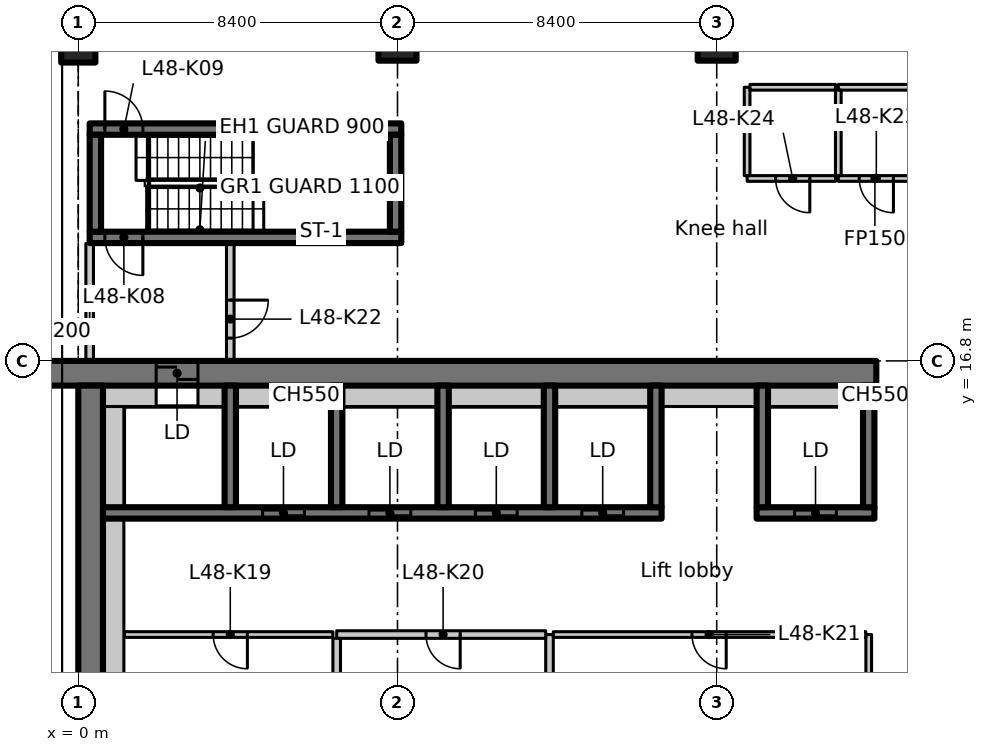
"""IFC4 building model, lengths in metres.
Left out: names, types, materials, properties, quantities, classifications, styles, units other than length and angle.
Written with IfcOpenShell. Run it as: python <this file> out.ifc"""

import sys

from ifc_helpers import new_model, si_unit, direction, frame, frame_2d, origin, origin_2d, place, context, subcontext, project, spatial, rectangle, extrude, element, fill, save


model = new_model("IFC4")
c1 = context("Model", 3, precision=1e-05, world=origin(), true_north=direction((0.0, 1.0)))
c2 = subcontext(c1, "Body", "Model", "MODEL_VIEW")
j1 = project(units=[si_unit("LENGTHUNIT", "METRE"), si_unit("PLANEANGLEUNIT", "RADIAN")], contexts=[c1])
p1 = place(None, origin())
s1 = spatial("IfcSite", under=j1, at=p1, CompositionType="ELEMENT")
p2 = place(p1, origin())
s2 = spatial("IfcBuilding", under=s1, at=p2, CompositionType="ELEMENT")
p3 = place(p2, frame((0.0, 0.0, 192.0)))
s3 = spatial("IfcBuildingStorey", under=s2, at=p3, CompositionType="ELEMENT", Elevation=192.0)
p4 = place(p3, frame((0.0, 25.2, 0.0), z_axis=(0.0, 0.0, 1.0), x_axis=(1.0, 0.0, 0.0)))
e1 = element("IfcColumn", 1, at=p4, inside=s3, PredefinedType="COLUMN", context=c2, shape_type="SweptSolid", body=[
    extrude(rectangle(XDim=0.9, YDim=1.1, at=origin_2d()), origin(), (0.0, 0.0, 1.0), 3.35),
])
for number, where, z_axis, x_axis in (
    (2, (8.4, 25.2, 0.0), (0.0, 0.0, 1.0), (1.0, 0.0, 0.0)),
    (3, (16.8, 25.2, 0.0), (0.0, 0.0, 1.0), (1.0, 0.0, 0.0)),
):
    element("IfcColumn", number, at=place(p3, frame(where, z_axis=z_axis, x_axis=x_axis)), inside=s3, PredefinedType="COLUMN", context=c2, shape_type="SweptSolid", body=[
        extrude(rectangle(XDim=1.0, YDim=1.0, at=origin_2d()), origin(), (0.0, 0.0, 1.0), 3.35),
    ])
p5 = place(p3, frame((-1.1, 16.475, 0.0), z_axis=(0.0, 0.0, 1.0), x_axis=(1.0, 0.0, 0.0)))
e4 = element("IfcWall", 4, at=p5, inside=s3, PredefinedType="SHEAR", context=c2, shape_type="SweptSolid", body=[
    extrude(rectangle(XDim=22.1, YDim=0.65, at=frame_2d((11.05, 0.0))), origin(), (0.0, 0.0, 1.0), 3.35),
])
p6 = place(p5, frame((3.15, 0.0, 0.0)))
e5 = element("IfcOpeningElement", 5, at=p6, cuts=e4, PredefinedType="OPENING", context=c2, shape_type="SweptSolid", body=[
    extrude(rectangle(XDim=1.1, YDim=2.3, at=frame_2d((0.55, 1.15))), frame((0.0, 0.335, 0.0), z_axis=(0.0, -1.0, 0.0), x_axis=(1.0, 0.0, 0.0)), (0.0, 0.0, 1.0), 0.67),
])
p7 = place(p3, frame((0.325, 7.286, 0.0), z_axis=(0.0, 0.0, 1.0), x_axis=(0.0, 1.0, 0.0)))
e6 = element("IfcWall", 6, at=p7, inside=s3, PredefinedType="SHEAR", context=c2, shape_type="SweptSolid", body=[
    extrude(rectangle(XDim=8.864, YDim=0.65, at=frame_2d((4.432, 0.0))), origin(), (0.0, 0.0, 1.0), 3.35),
])
p8 = place(p3, frame((0.65, 15.875, 0.0), z_axis=(0.0, 0.0, 1.0), x_axis=(1.0, 0.0, 0.0)))
e7 = element("IfcWall", 7, at=p8, inside=s3, PredefinedType="PARTITIONING", context=c2, shape_type="SweptSolid", body=[
    extrude(rectangle(XDim=1.4, YDim=0.55, at=frame_2d((0.7, 0.0))), origin(), (0.0, 0.0, 1.0), 3.35),
])
p9 = place(p3, frame((0.65, 12.8, 0.0), z_axis=(0.0, 0.0, 1.0), x_axis=(1.0, 0.0, 0.0)))
e8 = element("IfcWall", 8, at=p9, inside=s3, PredefinedType="SHEAR", context=c2, shape_type="SweptSolid", body=[
    extrude(rectangle(XDim=14.7, YDim=0.3, at=frame_2d((7.35, 0.0))), origin(), (0.0, 0.0, 1.0), 3.35),
])
p10 = place(p9, frame((4.2, 0.0, 0.0)))
e9 = element("IfcOpeningElement", 9, at=p10, cuts=e8, PredefinedType="OPENING", context=c2, shape_type="SweptSolid", body=[
    extrude(rectangle(XDim=1.1, YDim=2.3, at=frame_2d((0.55, 1.15))), frame((0.0, 0.16, 0.0), z_axis=(0.0, -1.0, 0.0), x_axis=(1.0, 0.0, 0.0)), (0.0, 0.0, 1.0), 0.32),
])
p11 = place(p9, frame((7.0, 0.0, 0.0)))
e10 = element("IfcOpeningElement", 10, at=p11, cuts=e8, PredefinedType="OPENING", context=c2, shape_type="SweptSolid", body=[
    extrude(rectangle(XDim=1.1, YDim=2.3, at=frame_2d((0.55, 1.15))), frame((0.0, 0.16, 0.0), z_axis=(0.0, -1.0, 0.0), x_axis=(1.0, 0.0, 0.0)), (0.0, 0.0, 1.0), 0.32),
])
p12 = place(p9, frame((9.8, 0.0, 0.0)))
e11 = element("IfcOpeningElement", 11, at=p12, cuts=e8, PredefinedType="OPENING", context=c2, shape_type="SweptSolid", body=[
    extrude(rectangle(XDim=1.1, YDim=2.3, at=frame_2d((0.55, 1.15))), frame((0.0, 0.16, 0.0), z_axis=(0.0, -1.0, 0.0), x_axis=(1.0, 0.0, 0.0)), (0.0, 0.0, 1.0), 0.32),
])
p13 = place(p9, frame((12.6, 0.0, 0.0)))
e12 = element("IfcOpeningElement", 12, at=p13, cuts=e8, PredefinedType="OPENING", context=c2, shape_type="SweptSolid", body=[
    extrude(rectangle(XDim=1.1, YDim=2.3, at=frame_2d((0.55, 1.15))), frame((0.0, 0.16, 0.0), z_axis=(0.0, -1.0, 0.0), x_axis=(1.0, 0.0, 0.0)), (0.0, 0.0, 1.0), 0.32),
])
for number, where, z_axis, x_axis in (
    (13, (4.0, 12.95, 0.0), (0.0, 0.0, 1.0), (0.0, 1.0, 0.0)),
    (14, (6.8, 12.95, 0.0), (0.0, 0.0, 1.0), (0.0, 1.0, 0.0)),
    (15, (9.6, 12.95, 0.0), (0.0, 0.0, 1.0), (0.0, 1.0, 0.0)),
    (16, (12.4, 12.95, 0.0), (0.0, 0.0, 1.0), (0.0, 1.0, 0.0)),
    (17, (15.2, 12.95, 0.0), (0.0, 0.0, 1.0), (0.0, 1.0, 0.0)),
):
    element("IfcWall", number, at=place(p3, frame(where, z_axis=z_axis, x_axis=x_axis)), inside=s3, PredefinedType="SHEAR", context=c2, shape_type="SweptSolid", body=[
        extrude(rectangle(XDim=3.2, YDim=0.3, at=frame_2d((1.6, 0.0))), origin(), (0.0, 0.0, 1.0), 3.35),
    ])
p14 = place(p3, frame((17.85, 12.8, 0.0), z_axis=(0.0, 0.0, 1.0), x_axis=(1.0, 0.0, 0.0)))
e18 = element("IfcWall", 18, at=p14, inside=s3, PredefinedType="SHEAR", context=c2, shape_type="SweptSolid", body=[
    extrude(rectangle(XDim=3.1, YDim=0.3, at=frame_2d((1.55, 0.0))), origin(), (0.0, 0.0, 1.0), 3.35),
])
p15 = place(p14, frame((1.0, 0.0, 0.0)))
e19 = element("IfcOpeningElement", 19, at=p15, cuts=e18, PredefinedType="OPENING", context=c2, shape_type="SweptSolid", body=[
    extrude(rectangle(XDim=1.1, YDim=2.3, at=frame_2d((0.55, 1.15))), frame((0.0, 0.16, 0.0), z_axis=(0.0, -1.0, 0.0), x_axis=(1.0, 0.0, 0.0)), (0.0, 0.0, 1.0), 0.32),
])
for number, where, z_axis, x_axis in (
    (20, (18.0, 12.95, 0.0), (0.0, 0.0, 1.0), (0.0, 1.0, 0.0)),
    (21, (20.8, 12.95, 0.0), (0.0, 0.0, 1.0), (0.0, 1.0, 0.0)),
):
    element("IfcWall", number, at=place(p3, frame(where, z_axis=z_axis, x_axis=x_axis)), inside=s3, PredefinedType="SHEAR", context=c2, shape_type="SweptSolid", body=[
        extrude(rectangle(XDim=3.2, YDim=0.3, at=frame_2d((1.6, 0.0))), origin(), (0.0, 0.0, 1.0), 3.35),
    ])
p16 = place(p3, frame((8.5, 20.05, 0.0), z_axis=(0.0, 0.0, 1.0), x_axis=(-1.0, 0.0, 0.0)))
e22 = element("IfcWall", 22, at=p16, inside=s3, PredefinedType="SHEAR", context=c2, shape_type="SweptSolid", body=[
    extrude(rectangle(XDim=8.2, YDim=0.3, at=frame_2d((4.1, 0.0))), origin(), (0.0, 0.0, 1.0), 3.35),
])
p17 = place(p16, frame((6.8, 0.0, 0.0)))
e23 = element("IfcOpeningElement", 23, at=p17, cuts=e22, PredefinedType="OPENING", context=c2, shape_type="SweptSolid", body=[
    extrude(rectangle(XDim=1.0, YDim=2.1, at=frame_2d((0.5, 1.05))), frame((0.0, 0.16, 0.0), z_axis=(0.0, -1.0, 0.0), x_axis=(1.0, 0.0, 0.0)), (0.0, 0.0, 1.0), 0.32),
])
p18 = place(p3, frame((0.3, 22.9, 0.0), z_axis=(0.0, 0.0, 1.0), x_axis=(1.0, 0.0, 0.0)))
e24 = element("IfcWall", 24, at=p18, inside=s3, PredefinedType="SHEAR", context=c2, shape_type="SweptSolid", body=[
    extrude(rectangle(XDim=8.2, YDim=0.3, at=frame_2d((4.1, 0.0))), origin(), (0.0, 0.0, 1.0), 3.35),
])
p19 = place(p18, frame((0.4, 0.0, 0.0)))
e25 = element("IfcOpeningElement", 25, at=p19, cuts=e24, PredefinedType="OPENING", context=c2, shape_type="SweptSolid", body=[
    extrude(rectangle(XDim=1.0, YDim=2.1, at=frame_2d((0.5, 1.05))), frame((0.0, 0.16, 0.0), z_axis=(0.0, -1.0, 0.0), x_axis=(1.0, 0.0, 0.0)), (0.0, 0.0, 1.0), 0.32),
])
for number, where, z_axis, x_axis in (
    (26, (0.45, 20.2, 0.0), (0.0, 0.0, 1.0), (0.0, 1.0, 0.0)),
    (27, (8.35, 20.2, 0.0), (0.0, 0.0, 1.0), (0.0, 1.0, 0.0)),
):
    element("IfcWall", number, at=place(p3, frame(where, z_axis=z_axis, x_axis=x_axis)), inside=s3, PredefinedType="SHEAR", context=c2, shape_type="SweptSolid", body=[
        extrude(rectangle(XDim=2.55, YDim=0.3, at=frame_2d((1.275, 0.0))), origin(), (0.0, 0.0, 1.0), 3.35),
    ])
p20 = place(p3, frame((0.3, 16.812, 0.0), z_axis=(0.0, 0.0, 1.0), x_axis=(0.0, 1.0, 0.0)))
e28 = element("IfcWall", 28, at=p20, inside=s3, PredefinedType="PARTITIONING", context=c2, shape_type="SweptSolid", body=[
    extrude(rectangle(XDim=3.076, YDim=0.2, at=frame_2d((1.538, 0.0))), origin(), (0.0, 0.0, 1.0), 2.98),
])
p21 = place(p3, frame((4.0, 19.888, 0.0), z_axis=(0.0, 0.0, 1.0), x_axis=(0.0, -1.0, 0.0)))
e29 = element("IfcWall", 29, at=p21, inside=s3, PredefinedType="PARTITIONING", context=c2, shape_type="SweptSolid", body=[
    extrude(rectangle(XDim=3.076, YDim=0.2, at=frame_2d((1.538, 0.0))), origin(), (0.0, 0.0, 1.0), 3.35),
])
p22 = place(p21, frame((1.488, 0.0, 0.0)))
e30 = element("IfcOpeningElement", 30, at=p22, cuts=e29, PredefinedType="OPENING", context=c2, shape_type="SweptSolid", body=[
    extrude(rectangle(XDim=1.0, YDim=2.1, at=frame_2d((0.5, 1.05))), frame((0.0, 0.11, 0.0), z_axis=(0.0, -1.0, 0.0), x_axis=(1.0, 0.0, 0.0)), (0.0, 0.0, 1.0), 0.22),
])
p23 = place(p3, frame((12.4, 7.1, 0.0), z_axis=(0.0, 0.0, 1.0), x_axis=(0.0, 1.0, 0.0)))
e31 = element("IfcWall", 31, at=p23, inside=s3, PredefinedType="PARTITIONING", context=c2, shape_type="SweptSolid", body=[
    extrude(rectangle(XDim=2.5, YDim=0.2, at=frame_2d((1.25, 0.0))), origin(), (0.0, 0.0, 1.0), 3.35),
])
p24 = place(p3, frame((12.3, 9.6, 0.0), z_axis=(0.0, 0.0, 1.0), x_axis=(-1.0, 0.0, 0.0)))
e32 = element("IfcWall", 32, at=p24, inside=s3, PredefinedType="PARTITIONING", context=c2, shape_type="SweptSolid", body=[
    extrude(rectangle(XDim=5.5, YDim=0.2, at=frame_2d((2.75, 0.0))), origin(), (0.0, 0.0, 1.0), 3.35),
])
p25 = place(p24, frame((2.25, 0.0, 0.0)))
e33 = element("IfcOpeningElement", 33, at=p25, cuts=e32, PredefinedType="OPENING", context=c2, shape_type="SweptSolid", body=[
    extrude(rectangle(XDim=0.9, YDim=2.1, at=frame_2d((0.45, 1.05))), frame((0.0, 0.11, 0.0), z_axis=(0.0, -1.0, 0.0), x_axis=(1.0, 0.0, 0.0)), (0.0, 0.0, 1.0), 0.22),
])
p26 = place(p3, frame((6.8, 9.5, 0.0), z_axis=(0.0, 0.0, 1.0), x_axis=(0.0, -1.0, 0.0)))
e34 = element("IfcWall", 34, at=p26, inside=s3, PredefinedType="PARTITIONING", context=c2, shape_type="SweptSolid", body=[
    extrude(rectangle(XDim=2.4, YDim=0.2, at=frame_2d((1.2, 0.0))), origin(), (0.0, 0.0, 1.0), 3.35),
])
p27 = place(p3, frame((6.7, 9.6, 0.0), z_axis=(0.0, 0.0, 1.0), x_axis=(-1.0, 0.0, 0.0)))
e35 = element("IfcWall", 35, at=p27, inside=s3, PredefinedType="PARTITIONING", context=c2, shape_type="SweptSolid", body=[
    extrude(rectangle(XDim=5.488, YDim=0.15, at=frame_2d((2.744, 0.0))), origin(), (0.0, 0.0, 1.0), 3.35),
])
p28 = place(p27, frame((2.25, 0.0, 0.0)))
e36 = element("IfcOpeningElement", 36, at=p28, cuts=e35, PredefinedType="OPENING", context=c2, shape_type="SweptSolid", body=[
    extrude(rectangle(XDim=0.9, YDim=2.1, at=frame_2d((0.45, 1.05))), frame((0.0, 0.085, 0.0), z_axis=(0.0, -1.0, 0.0), x_axis=(1.0, 0.0, 0.0)), (0.0, 0.0, 1.0), 0.17),
])
p29 = place(p3, frame((20.8, 7.075, 0.0), z_axis=(0.0, 0.0, 1.0), x_axis=(0.0, 1.0, 0.0)))
e37 = element("IfcWall", 37, at=p29, inside=s3, PredefinedType="PARTITIONING", context=c2, shape_type="SweptSolid", body=[
    extrude(rectangle(XDim=2.525, YDim=0.15, at=frame_2d((1.263, 0.0))), origin(), (0.0, 0.0, 1.0), 3.35),
])
p30 = place(p3, frame((20.725, 9.6, 0.0), z_axis=(0.0, 0.0, 1.0), x_axis=(-1.0, 0.0, 0.0)))
e38 = element("IfcWall", 38, at=p30, inside=s3, PredefinedType="PARTITIONING", context=c2, shape_type="SweptSolid", body=[
    extrude(rectangle(XDim=8.225, YDim=0.15, at=frame_2d((4.113, 0.0))), origin(), (0.0, 0.0, 1.0), 3.35),
])
p31 = place(p30, frame((3.675, 0.0, 0.0)))
e39 = element("IfcOpeningElement", 39, at=p31, cuts=e38, PredefinedType="OPENING", context=c2, shape_type="SweptSolid", body=[
    extrude(rectangle(XDim=0.9, YDim=2.1, at=frame_2d((0.45, 1.05))), frame((0.0, 0.085, 0.0), z_axis=(0.0, -1.0, 0.0), x_axis=(1.0, 0.0, 0.0)), (0.0, 0.0, 1.0), 0.17),
])
p32 = place(p3, frame((20.0, 24.0, 0.0), z_axis=(0.0, 0.0, 1.0), x_axis=(1.0, 0.0, 0.0)))
e40 = element("IfcWall", 40, at=p32, inside=s3, PredefinedType="PARTITIONING", context=c2, shape_type="SweptSolid", body=[
    extrude(rectangle(XDim=2.0, YDim=0.15, at=frame_2d((1.0, 0.0))), origin(), (0.0, 0.0, 1.0), 3.35),
])
p33 = place(p3, frame((21.925, 21.6, 0.0), z_axis=(0.0, 0.0, 1.0), x_axis=(-1.0, 0.0, 0.0)))
e41 = element("IfcWall", 41, at=p33, inside=s3, PredefinedType="PARTITIONING", context=c2, shape_type="SweptSolid", body=[
    extrude(rectangle(XDim=1.925, YDim=0.15, at=frame_2d((0.962, 0.0))), origin(), (0.0, 0.0, 1.0), 3.35),
])
p34 = place(p33, frame((0.475, 0.0, 0.0)))
e42 = element("IfcOpeningElement", 42, at=p34, cuts=e41, PredefinedType="OPENING", context=c2, shape_type="SweptSolid", body=[
    extrude(rectangle(XDim=0.9, YDim=2.1, at=frame_2d((0.45, 1.05))), frame((0.0, 0.085, 0.0), z_axis=(0.0, -1.0, 0.0), x_axis=(1.0, 0.0, 0.0)), (0.0, 0.0, 1.0), 0.17),
])
p35 = place(p3, frame((20.0, 21.675, 0.0), z_axis=(0.0, 0.0, 1.0), x_axis=(0.0, 1.0, 0.0)))
e43 = element("IfcWall", 43, at=p35, inside=s3, PredefinedType="PARTITIONING", context=c2, shape_type="SweptSolid", body=[
    extrude(rectangle(XDim=2.25, YDim=0.15, at=frame_2d((1.125, 0.0))), origin(), (0.0, 0.0, 1.0), 3.35),
])
p36 = place(p3, frame((19.925, 21.6, 0.0), z_axis=(0.0, 0.0, 1.0), x_axis=(-1.0, 0.0, 0.0)))
e44 = element("IfcWall", 44, at=p36, inside=s3, PredefinedType="PARTITIONING", context=c2, shape_type="SweptSolid", body=[
    extrude(rectangle(XDim=2.325, YDim=0.15, at=frame_2d((1.163, 0.0))), origin(), (0.0, 0.0, 1.0), 3.35),
])
p37 = place(p36, frame((0.675, 0.0, 0.0)))
e45 = element("IfcOpeningElement", 45, at=p37, cuts=e44, PredefinedType="OPENING", context=c2, shape_type="SweptSolid", body=[
    extrude(rectangle(XDim=0.9, YDim=2.1, at=frame_2d((0.45, 1.05))), frame((0.0, 0.085, 0.0), z_axis=(0.0, -1.0, 0.0), x_axis=(1.0, 0.0, 0.0)), (0.0, 0.0, 1.0), 0.17),
])
p38 = place(p3, frame((17.6, 21.675, 0.0), z_axis=(0.0, 0.0, 1.0), x_axis=(0.0, 1.0, 0.0)))
e46 = element("IfcWall", 46, at=p38, inside=s3, PredefinedType="PARTITIONING", context=c2, shape_type="SweptSolid", body=[
    extrude(rectangle(XDim=2.325, YDim=0.15, at=frame_2d((1.163, 0.0))), origin(), (0.0, 0.0, 1.0), 3.35),
])
p39 = place(p3, frame((17.675, 24.0, 0.0), z_axis=(0.0, 0.0, 1.0), x_axis=(1.0, 0.0, 0.0)))
e47 = element("IfcWall", 47, at=p39, inside=s3, PredefinedType="PARTITIONING", context=c2, shape_type="SweptSolid", body=[
    extrude(rectangle(XDim=2.25, YDim=0.15, at=frame_2d((1.125, 0.0))), origin(), (0.0, 0.0, 1.0), 3.35),
])
p40 = place(p3, frame((0.925, 7.286, 0.0), z_axis=(0.0, 0.0, 1.0), x_axis=(0.0, 1.0, 0.0)))
e48 = element("IfcWall", 48, at=p40, inside=s3, PredefinedType="PARTITIONING", context=c2, shape_type="SweptSolid", body=[
    extrude(rectangle(XDim=5.364, YDim=0.55, at=frame_2d((2.682, 0.0))), origin(), (0.0, 0.0, 1.0), 3.35),
])
p41 = place(p3, frame((0.925, 12.95, 0.0), z_axis=(0.0, 0.0, 1.0), x_axis=(0.0, 1.0, 0.0)))
e49 = element("IfcWall", 49, at=p41, inside=s3, PredefinedType="PARTITIONING", context=c2, shape_type="SweptSolid", body=[
    extrude(rectangle(XDim=2.65, YDim=0.55, at=frame_2d((1.325, 0.0))), origin(), (0.0, 0.0, 1.0), 3.35),
])
p42 = place(p3, frame((3.15, 15.875, 0.0), z_axis=(0.0, 0.0, 1.0), x_axis=(1.0, 0.0, 0.0)))
e50 = element("IfcWall", 50, at=p42, inside=s3, PredefinedType="PARTITIONING", context=c2, shape_type="SweptSolid", body=[
    extrude(rectangle(XDim=0.7, YDim=0.55, at=frame_2d((0.35, 0.0))), origin(), (0.0, 0.0, 1.0), 3.35),
])
for number, where, z_axis, x_axis in (
    (51, (4.15, 15.875, 0.0), (0.0, 0.0, 1.0), (1.0, 0.0, 0.0)),
    (52, (6.95, 15.875, 0.0), (0.0, 0.0, 1.0), (1.0, 0.0, 0.0)),
    (53, (9.75, 15.875, 0.0), (0.0, 0.0, 1.0), (1.0, 0.0, 0.0)),
    (54, (12.55, 15.875, 0.0), (0.0, 0.0, 1.0), (1.0, 0.0, 0.0)),
    (55, (15.35, 15.875, 0.0), (0.0, 0.0, 1.0), (1.0, 0.0, 0.0)),
    (56, (18.15, 15.875, 0.0), (0.0, 0.0, 1.0), (1.0, 0.0, 0.0)),
):
    element("IfcWall", number, at=place(p3, frame(where, z_axis=z_axis, x_axis=x_axis)), inside=s3, PredefinedType="PARTITIONING", context=c2, shape_type="SweptSolid", body=[
        extrude(rectangle(XDim=2.5, YDim=0.55, at=frame_2d((1.25, 0.0))), origin(), (0.0, 0.0, 1.0), 3.35),
    ])
p43 = place(p3, frame((20.95, 15.875, 0.0), z_axis=(0.0, 0.0, 1.0), x_axis=(1.0, 0.0, 0.0)))
e57 = element("IfcWall", 57, at=p43, inside=s3, PredefinedType="PARTITIONING", context=c2, shape_type="SweptSolid", body=[
    extrude(rectangle(XDim=0.05, YDim=0.55, at=frame_2d((0.025, 0.0))), origin(), (0.0, 0.0, 1.0), 3.35),
])
p44 = place(p6, origin())
e58 = element("IfcDoor", 58, at=p44, inside=s3, OperationType="SLIDING_TO_LEFT", PredefinedType="DOOR", context=c2, shape_type="SweptSolid", body=[
    extrude(rectangle(XDim=1.1, YDim=2.3, at=frame_2d((0.55, 1.15))), frame((0.0, 0.025, 0.0), z_axis=(0.0, -1.0, 0.0), x_axis=(1.0, 0.0, 0.0)), (0.0, 0.0, 1.0), 0.05),
])
fill(e5, e58)
p45 = place(p10, origin())
e59 = element("IfcDoor", 59, at=p45, inside=s3, OperationType="SLIDING_TO_LEFT", PredefinedType="DOOR", context=c2, shape_type="SweptSolid", body=[
    extrude(rectangle(XDim=1.1, YDim=2.3, at=frame_2d((0.55, 1.15))), frame((0.0, 0.025, 0.0), z_axis=(0.0, -1.0, 0.0), x_axis=(1.0, 0.0, 0.0)), (0.0, 0.0, 1.0), 0.05),
])
fill(e9, e59)
p46 = place(p11, origin())
e60 = element("IfcDoor", 60, at=p46, inside=s3, OperationType="SLIDING_TO_LEFT", PredefinedType="DOOR", context=c2, shape_type="SweptSolid", body=[
    extrude(rectangle(XDim=1.1, YDim=2.3, at=frame_2d((0.55, 1.15))), frame((0.0, 0.025, 0.0), z_axis=(0.0, -1.0, 0.0), x_axis=(1.0, 0.0, 0.0)), (0.0, 0.0, 1.0), 0.05),
])
fill(e10, e60)
p47 = place(p12, origin())
e61 = element("IfcDoor", 61, at=p47, inside=s3, OperationType="SLIDING_TO_LEFT", PredefinedType="DOOR", context=c2, shape_type="SweptSolid", body=[
    extrude(rectangle(XDim=1.1, YDim=2.3, at=frame_2d((0.55, 1.15))), frame((0.0, 0.025, 0.0), z_axis=(0.0, -1.0, 0.0), x_axis=(1.0, 0.0, 0.0)), (0.0, 0.0, 1.0), 0.05),
])
fill(e11, e61)
p48 = place(p13, origin())
e62 = element("IfcDoor", 62, at=p48, inside=s3, OperationType="SLIDING_TO_LEFT", PredefinedType="DOOR", context=c2, shape_type="SweptSolid", body=[
    extrude(rectangle(XDim=1.1, YDim=2.3, at=frame_2d((0.55, 1.15))), frame((0.0, 0.025, 0.0), z_axis=(0.0, -1.0, 0.0), x_axis=(1.0, 0.0, 0.0)), (0.0, 0.0, 1.0), 0.05),
])
fill(e12, e62)
p49 = place(p15, origin())
e63 = element("IfcDoor", 63, at=p49, inside=s3, OperationType="SLIDING_TO_LEFT", PredefinedType="DOOR", context=c2, shape_type="SweptSolid", body=[
    extrude(rectangle(XDim=1.1, YDim=2.3, at=frame_2d((0.55, 1.15))), frame((0.0, 0.025, 0.0), z_axis=(0.0, -1.0, 0.0), x_axis=(1.0, 0.0, 0.0)), (0.0, 0.0, 1.0), 0.05),
])
fill(e19, e63)
p50 = place(p17, origin())
e64 = element("IfcDoor", 64, at=p50, inside=s3, OperationType="SINGLE_SWING_LEFT", PredefinedType="DOOR", context=c2, shape_type="SweptSolid", body=[
    extrude(rectangle(XDim=1.0, YDim=2.1, at=frame_2d((0.5, 1.05))), frame((0.0, 0.025, 0.0), z_axis=(0.0, -1.0, 0.0), x_axis=(1.0, 0.0, 0.0)), (0.0, 0.0, 1.0), 0.05),
])
fill(e23, e64)
p51 = place(p19, origin())
e65 = element("IfcDoor", 65, at=p51, inside=s3, OperationType="SINGLE_SWING_RIGHT", PredefinedType="DOOR", context=c2, shape_type="SweptSolid", body=[
    extrude(rectangle(XDim=1.0, YDim=2.1, at=frame_2d((0.5, 1.05))), frame((0.0, 0.025, 0.0), z_axis=(0.0, -1.0, 0.0), x_axis=(1.0, 0.0, 0.0)), (0.0, 0.0, 1.0), 0.05),
])
fill(e25, e65)
p52 = place(p28, origin())
e66 = element("IfcDoor", 66, at=p52, inside=s3, OperationType="SINGLE_SWING_RIGHT", PredefinedType="DOOR", context=c2, shape_type="SweptSolid", body=[
    extrude(rectangle(XDim=0.9, YDim=2.1, at=frame_2d((0.45, 1.05))), frame((0.0, 0.025, 0.0), z_axis=(0.0, -1.0, 0.0), x_axis=(1.0, 0.0, 0.0)), (0.0, 0.0, 1.0), 0.05),
])
fill(e36, e66)
p53 = place(p25, origin())
e67 = element("IfcDoor", 67, at=p53, inside=s3, OperationType="SINGLE_SWING_LEFT", PredefinedType="DOOR", context=c2, shape_type="SweptSolid", body=[
    extrude(rectangle(XDim=0.9, YDim=2.1, at=frame_2d((0.45, 1.05))), frame((0.0, 0.025, 0.0), z_axis=(0.0, -1.0, 0.0), x_axis=(1.0, 0.0, 0.0)), (0.0, 0.0, 1.0), 0.05),
])
fill(e33, e67)
p54 = place(p31, origin())
e68 = element("IfcDoor", 68, at=p54, inside=s3, OperationType="SINGLE_SWING_RIGHT", PredefinedType="DOOR", context=c2, shape_type="SweptSolid", body=[
    extrude(rectangle(XDim=0.9, YDim=2.1, at=frame_2d((0.45, 1.05))), frame((0.0, 0.025, 0.0), z_axis=(0.0, -1.0, 0.0), x_axis=(1.0, 0.0, 0.0)), (0.0, 0.0, 1.0), 0.05),
])
fill(e39, e68)
p55 = place(p22, origin())
e69 = element("IfcDoor", 69, at=p55, inside=s3, OperationType="SINGLE_SWING_LEFT", PredefinedType="DOOR", context=c2, shape_type="SweptSolid", body=[
    extrude(rectangle(XDim=1.0, YDim=2.1, at=frame_2d((0.5, 1.05))), frame((0.0, 0.025, 0.0), z_axis=(0.0, -1.0, 0.0), x_axis=(1.0, 0.0, 0.0)), (0.0, 0.0, 1.0), 0.05),
])
fill(e30, e69)
p56 = place(p34, origin())
e70 = element("IfcDoor", 70, at=p56, inside=s3, OperationType="SINGLE_SWING_RIGHT", PredefinedType="DOOR", context=c2, shape_type="SweptSolid", body=[
    extrude(rectangle(XDim=0.9, YDim=2.1, at=frame_2d((0.45, 1.05))), frame((0.0, 0.025, 0.0), z_axis=(0.0, -1.0, 0.0), x_axis=(1.0, 0.0, 0.0)), (0.0, 0.0, 1.0), 0.05),
])
fill(e42, e70)
p57 = place(p37, origin())
e71 = element("IfcDoor", 71, at=p57, inside=s3, OperationType="SINGLE_SWING_LEFT", PredefinedType="DOOR", context=c2, shape_type="SweptSolid", body=[
    extrude(rectangle(XDim=0.9, YDim=2.1, at=frame_2d((0.45, 1.05))), frame((0.0, 0.025, 0.0), z_axis=(0.0, -1.0, 0.0), x_axis=(1.0, 0.0, 0.0)), (0.0, 0.0, 1.0), 0.05),
])
fill(e45, e71)
save(model, sys.argv[1])
